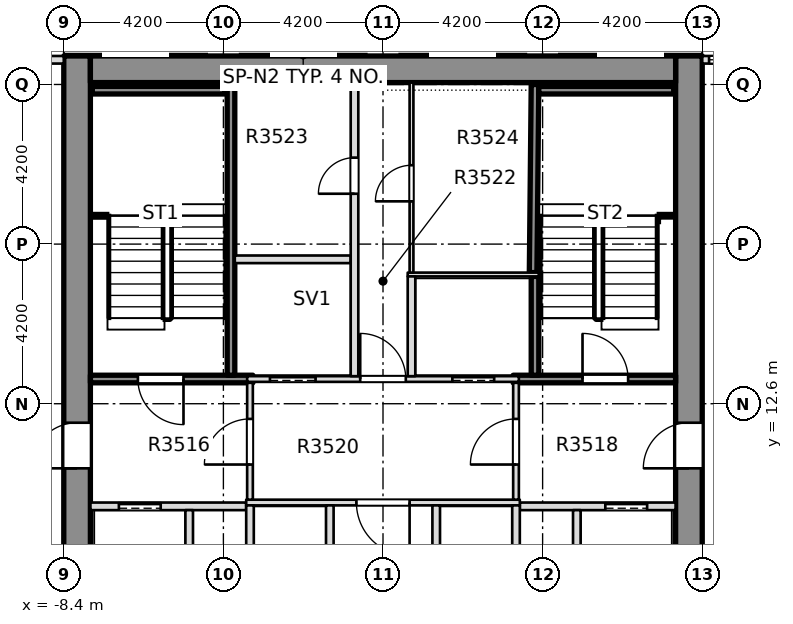
"""IFC4 building model, lengths in metres.
Left out: names, types, materials, properties, quantities, classifications, styles, units other than length and angle.
Written with IfcOpenShell. Run it as: python <this file> out.ifc"""

import sys

from ifc_helpers import new_model, si_unit, direction, frame, frame_2d, origin, place, context, subcontext, project, spatial, rectangle, extrude, element, fill, save


model = new_model("IFC4")
c1 = context("Model", 3, precision=1e-05, world=origin(), true_north=direction((0.0, 1.0)))
c2 = subcontext(c1, "Body", "Model", "MODEL_VIEW")
j1 = project(units=[si_unit("LENGTHUNIT", "METRE"), si_unit("PLANEANGLEUNIT", "RADIAN")], contexts=[c1])
p1 = place(None, origin())
s1 = spatial("IfcSite", under=j1, at=p1, CompositionType="ELEMENT")
p2 = place(p1, origin())
s2 = spatial("IfcBuilding", under=s1, at=p2, CompositionType="ELEMENT")
p3 = place(p2, frame((0.0, 0.0, 140.0)))
s3 = spatial("IfcBuildingStorey", under=s2, at=p3, CompositionType="ELEMENT", Elevation=140.0)
p4 = place(p3, frame((8.05, -8.4, -0.4), z_axis=(0.0, 0.0, 1.0), x_axis=(0.0, 1.0, 0.0)))
e1 = element("IfcWall", 1, at=p4, inside=s3, PredefinedType="SOLIDWALL", context=c2, shape_type="SweptSolid", body=[
    extrude(rectangle(XDim=30.15, YDim=0.7, at=frame_2d((15.075, 0.0))), origin(), (0.0, 0.0, 1.0), 3.45),
])
p5 = place(p4, frame((19.3, 0.0, 0.4)))
e2 = element("IfcOpeningElement", 2, at=p5, cuts=e1, PredefinedType="OPENING", context=c2, shape_type="SweptSolid", body=[
    extrude(rectangle(XDim=1.2, YDim=2.1, at=frame_2d((0.6, 1.05))), frame((0.0, 0.36, 0.0), z_axis=(0.0, -1.0, 0.0), x_axis=(1.0, 0.0, 0.0)), (0.0, 0.0, 1.0), 0.72),
])
p6 = place(p3, frame((-8.05, -8.4, -0.4), z_axis=(0.0, 0.0, 1.0), x_axis=(0.0, 1.0, 0.0)))
e3 = element("IfcWall", 3, at=p6, inside=s3, PredefinedType="SOLIDWALL", context=c2, shape_type="SweptSolid", body=[
    extrude(rectangle(XDim=30.15, YDim=0.7, at=frame_2d((15.075, 0.0))), origin(), (0.0, 0.0, 1.0), 3.45),
])
p7 = place(p6, frame((19.3, 0.0, 0.4)))
e4 = element("IfcOpeningElement", 4, at=p7, cuts=e3, PredefinedType="OPENING", context=c2, shape_type="SweptSolid", body=[
    extrude(rectangle(XDim=1.2, YDim=2.1, at=frame_2d((0.6, 1.05))), frame((0.0, 0.36, 0.0), z_axis=(0.0, -1.0, 0.0), x_axis=(1.0, 0.0, 0.0)), (0.0, 0.0, 1.0), 0.72),
])
p8 = place(p3, frame((-7.7, 21.4, -0.4), z_axis=(0.0, 0.0, 1.0), x_axis=(1.0, 0.0, 0.0)))
e5 = element("IfcWall", 5, at=p8, inside=s3, PredefinedType="SHEAR", context=c2, shape_type="SweptSolid", body=[
    extrude(rectangle(XDim=15.4, YDim=0.7, at=frame_2d((7.7, 0.0))), origin(), (0.0, 0.0, 1.0), 3.45),
])
p9 = place(p3, frame((12.05, 21.65, 0.0), z_axis=(0.0, 0.0, 1.0), x_axis=(-1.0, 0.0, 0.0)))
e6 = element("IfcWall", 6, at=p9, inside=s3, PredefinedType="STANDARD", context=c2, shape_type="SweptSolid", body=[
    extrude(rectangle(XDim=3.65, YDim=0.2, at=frame_2d((1.825, 0.0))), origin(), (0.0, 0.0, 1.0), 3.05),
])
p10 = place(p9, frame((1.67, 0.0, 0.2)))
e7 = element("IfcOpeningElement", 7, at=p10, cuts=e6, PredefinedType="OPENING", context=c2, shape_type="SweptSolid", body=[
    extrude(rectangle(XDim=1.8, YDim=2.65, at=frame_2d((0.9, 1.325))), frame((0.0, 0.11, 0.0), z_axis=(0.0, -1.0, 0.0), x_axis=(1.0, 0.0, 0.0)), (0.0, 0.0, 1.0), 0.22),
])
p11 = place(p3, frame((-8.4, 21.65, 0.0), z_axis=(0.0, 0.0, 1.0), x_axis=(-1.0, 0.0, 0.0)))
e8 = element("IfcWall", 8, at=p11, inside=s3, PredefinedType="STANDARD", context=c2, shape_type="SweptSolid", body=[
    extrude(rectangle(XDim=3.65, YDim=0.2, at=frame_2d((1.825, 0.0))), origin(), (0.0, 0.0, 1.0), 3.05),
])
p12 = place(p11, frame((0.375, 0.0, 0.2)))
e9 = element("IfcOpeningElement", 9, at=p12, cuts=e8, PredefinedType="OPENING", context=c2, shape_type="SweptSolid", body=[
    extrude(rectangle(XDim=1.8, YDim=2.65, at=frame_2d((0.9, 1.325))), frame((0.0, 0.11, 0.0), z_axis=(0.0, -1.0, 0.0), x_axis=(1.0, 0.0, 0.0)), (0.0, 0.0, 1.0), 0.22),
])
p13 = place(p3, frame((-7.699, 9.9, 0.0), z_axis=(0.0, 0.0, 1.0), x_axis=(1.0, 0.0, 0.0)))
e10 = element("IfcWall", 10, at=p13, inside=s3, PredefinedType="PARTITIONING", context=c2, shape_type="SweptSolid", body=[
    extrude(rectangle(XDim=4.099, YDim=0.2, at=frame_2d((2.049, 0.0))), origin(), (0.0, 0.0, 1.0), 3.05),
])
p14 = place(p13, frame((0.749, 0.0, 0.0)))
e11 = element("IfcOpeningElement", 11, at=p14, cuts=e10, PredefinedType="OPENING", context=c2, shape_type="SweptSolid", body=[
    extrude(rectangle(XDim=1.1, YDim=2.1, at=frame_2d((0.55, 1.05))), frame((0.0, 0.11, 0.0), z_axis=(0.0, -1.0, 0.0), x_axis=(1.0, 0.0, 0.0)), (0.0, 0.0, 1.0), 0.22),
])
p15 = place(p3, frame((3.6, 9.9, 0.0), z_axis=(0.0, 0.0, 1.0), x_axis=(1.0, 0.0, 0.0)))
e12 = element("IfcWall", 12, at=p15, inside=s3, PredefinedType="PARTITIONING", context=c2, shape_type="SweptSolid", body=[
    extrude(rectangle(XDim=4.099, YDim=0.2, at=frame_2d((2.049, 0.0))), origin(), (0.0, 0.0, 1.0), 3.05),
])
p16 = place(p15, frame((2.25, 0.0, 0.0)))
e13 = element("IfcOpeningElement", 13, at=p16, cuts=e12, PredefinedType="OPENING", context=c2, shape_type="SweptSolid", body=[
    extrude(rectangle(XDim=1.1, YDim=2.1, at=frame_2d((0.55, 1.05))), frame((0.0, 0.11, 0.0), z_axis=(0.0, -1.0, 0.0), x_axis=(1.0, 0.0, 0.0)), (0.0, 0.0, 1.0), 0.22),
])
p17 = place(p3, frame((-3.6, 10.0, 0.0), z_axis=(0.0, 0.0, 1.0), x_axis=(1.0, 0.0, 0.0)))
e14 = element("IfcWall", 14, at=p17, inside=s3, PredefinedType="PARTITIONING", context=c2, shape_type="SweptSolid", body=[
    extrude(rectangle(XDim=7.2, YDim=0.15, at=frame_2d((3.6, 0.0))), origin(), (0.0, 0.0, 1.0), 3.05),
])
p18 = place(p17, frame((2.9, 0.0, 0.0)))
e15 = element("IfcOpeningElement", 15, at=p18, cuts=e14, PredefinedType="OPENING", context=c2, shape_type="SweptSolid", body=[
    extrude(rectangle(XDim=1.4, YDim=2.1, at=frame_2d((0.7, 1.05))), frame((0.0, 0.085, 0.0), z_axis=(0.0, -1.0, 0.0), x_axis=(1.0, 0.0, 0.0)), (0.0, 0.0, 1.0), 0.17),
])
p19 = place(p3, frame((-7.699, 13.25, 0.0), z_axis=(0.0, 0.0, 1.0), x_axis=(1.0, 0.0, 0.0)))
e16 = element("IfcWall", 16, at=p19, inside=s3, PredefinedType="SOLIDWALL", context=c2, shape_type="SweptSolid", body=[
    extrude(rectangle(XDim=4.274, YDim=0.2, at=frame_2d((2.137, 0.0))), origin(), (0.0, 0.0, 1.0), 3.05),
])
p20 = place(p19, frame((1.249, 0.0, 0.0)))
e17 = element("IfcOpeningElement", 17, at=p20, cuts=e16, PredefinedType="OPENING", context=c2, shape_type="SweptSolid", body=[
    extrude(rectangle(XDim=1.2, YDim=2.1, at=frame_2d((0.6, 1.05))), frame((0.0, 0.11, 0.0), z_axis=(0.0, -1.0, 0.0), x_axis=(1.0, 0.0, 0.0)), (0.0, 0.0, 1.0), 0.22),
])
p21 = place(p3, frame((-3.575, 13.25, 0.0), z_axis=(0.0, 0.0, 1.0), x_axis=(1.0, 0.0, 0.0)))
e18 = element("IfcWall", 18, at=p21, inside=s3, PredefinedType="PARTITIONING", context=c2, shape_type="SweptSolid", body=[
    extrude(rectangle(XDim=7.15, YDim=0.15, at=frame_2d((3.575, 0.0))), origin(), (0.0, 0.0, 1.0), 3.05),
])
p22 = place(p21, frame((0.6, 0.0, 0.0)))
e19 = element("IfcOpeningElement", 19, at=p22, cuts=e18, PredefinedType="OPENING", context=c2, shape_type="SweptSolid", body=[
    extrude(rectangle(XDim=1.2, YDim=2.1, at=frame_2d((0.6, 1.05))), frame((0.0, 0.085, 0.0), z_axis=(0.0, -1.0, 0.0), x_axis=(1.0, 0.0, 0.0)), (0.0, 0.0, 1.0), 0.17),
])
p23 = place(p21, frame((5.4, 0.0, 0.0)))
e20 = element("IfcOpeningElement", 20, at=p23, cuts=e18, PredefinedType="OPENING", context=c2, shape_type="SweptSolid", body=[
    extrude(rectangle(XDim=1.1, YDim=2.1, at=frame_2d((0.55, 1.05))), frame((0.0, 0.085, 0.0), z_axis=(0.0, -1.0, 0.0), x_axis=(1.0, 0.0, 0.0)), (0.0, 0.0, 1.0), 0.17),
])
p24 = place(p21, frame((2.975, 0.0, 0.0)))
e21 = element("IfcOpeningElement", 21, at=p24, cuts=e18, PredefinedType="OPENING", context=c2, shape_type="SweptSolid", body=[
    extrude(rectangle(XDim=1.2, YDim=2.1, at=frame_2d((0.6, 1.05))), frame((0.0, 0.085, 0.0), z_axis=(0.0, -1.0, 0.0), x_axis=(1.0, 0.0, 0.0)), (0.0, 0.0, 1.0), 0.17),
])
p25 = place(p3, frame((3.425, 13.25, 0.0), z_axis=(0.0, 0.0, 1.0), x_axis=(1.0, 0.0, 0.0)))
e22 = element("IfcWall", 22, at=p25, inside=s3, PredefinedType="SOLIDWALL", context=c2, shape_type="SweptSolid", body=[
    extrude(rectangle(XDim=4.274, YDim=0.2, at=frame_2d((2.137, 0.0))), origin(), (0.0, 0.0, 1.0), 3.05),
])
p26 = place(p25, frame((1.825, 0.0, 0.0)))
e23 = element("IfcOpeningElement", 23, at=p26, cuts=e22, PredefinedType="OPENING", context=c2, shape_type="SweptSolid", body=[
    extrude(rectangle(XDim=1.2, YDim=2.1, at=frame_2d((0.6, 1.05))), frame((0.0, 0.11, 0.0), z_axis=(0.0, -1.0, 0.0), x_axis=(1.0, 0.0, 0.0)), (0.0, 0.0, 1.0), 0.22),
])
p27 = place(p3, frame((0.65, 16.0, 0.0), z_axis=(0.0, 0.0, 1.0), x_axis=(1.0, 0.0, 0.0)))
e24 = element("IfcWall", 24, at=p27, inside=s3, PredefinedType="PARTITIONING", context=c2, shape_type="SweptSolid", body=[
    extrude(rectangle(XDim=3.45, YDim=0.1, at=frame_2d((1.725, 0.0))), origin(), (0.0, 0.0, 1.0), 3.05),
])
p28 = place(p3, frame((-3.9, 16.4, 0.0), z_axis=(0.0, 0.0, 1.0), x_axis=(1.0, 0.0, 0.0)))
e25 = element("IfcWall", 25, at=p28, inside=s3, PredefinedType="PARTITIONING", context=c2, shape_type="SweptSolid", body=[
    extrude(rectangle(XDim=3.05, YDim=0.2, at=frame_2d((1.525, 0.0))), origin(), (0.0, 0.0, 1.0), 3.05),
])
p29 = place(p3, frame((-5.1, 7.075, 0.0), z_axis=(0.0, 0.0, 1.0), x_axis=(0.0, 1.0, 0.0)))
e26 = element("IfcWall", 26, at=p29, inside=s3, PredefinedType="PARTITIONING", context=c2, shape_type="SweptSolid", body=[
    extrude(rectangle(XDim=2.725, YDim=0.2, at=frame_2d((1.363, 0.0))), origin(), (0.0, 0.0, 1.0), 3.05),
])
p30 = place(p3, frame((-4.0, 13.35, 0.0), z_axis=(0.0, 0.0, 1.0), x_axis=(0.0, 1.0, 0.0)))
e27 = element("IfcWall", 27, at=p30, inside=s3, PredefinedType="SOLIDWALL", context=c2, shape_type="SweptSolid", body=[
    extrude(rectangle(XDim=7.699, YDim=0.2, at=frame_2d((3.85, 0.0))), origin(), (0.0, 0.0, 1.0), 3.05),
])
p31 = place(p3, frame((-3.5, 7.075, 0.0), z_axis=(0.0, 0.0, 1.0), x_axis=(0.0, 1.0, 0.0)))
e28 = element("IfcWall", 28, at=p31, inside=s3, PredefinedType="PARTITIONING", context=c2, shape_type="SweptSolid", body=[
    extrude(rectangle(XDim=2.85, YDim=0.2, at=frame_2d((1.425, 0.0))), origin(), (0.0, 0.0, 1.0), 3.05),
])
p32 = place(p3, frame((-3.5, 10.075, 0.0), z_axis=(0.0, 0.0, 1.0), x_axis=(0.0, 1.0, 0.0)))
e29 = element("IfcWall", 29, at=p32, inside=s3, PredefinedType="PARTITIONING", context=c2, shape_type="SweptSolid", body=[
    extrude(rectangle(XDim=3.075, YDim=0.15, at=frame_2d((1.538, 0.0))), origin(), (0.0, 0.0, 1.0), 3.05),
])
p33 = place(p32, frame((0.925, 0.0, 0.0)))
e30 = element("IfcOpeningElement", 30, at=p33, cuts=e29, PredefinedType="OPENING", context=c2, shape_type="SweptSolid", body=[
    extrude(rectangle(XDim=1.2, YDim=2.1, at=frame_2d((0.6, 1.05))), frame((0.0, 0.085, 0.0), z_axis=(0.0, -1.0, 0.0), x_axis=(1.0, 0.0, 0.0)), (0.0, 0.0, 1.0), 0.17),
])
p34 = place(p3, frame((-1.4, 7.075, 0.0), z_axis=(0.0, 0.0, 1.0), x_axis=(0.0, 1.0, 0.0)))
e31 = element("IfcWall", 31, at=p34, inside=s3, PredefinedType="PARTITIONING", context=c2, shape_type="SweptSolid", body=[
    extrude(rectangle(XDim=2.85, YDim=0.2, at=frame_2d((1.425, 0.0))), origin(), (0.0, 0.0, 1.0), 3.05),
])
p35 = place(p3, frame((-0.75, 13.325, 0.0), z_axis=(0.0, 0.0, 1.0), x_axis=(0.0, 1.0, 0.0)))
e32 = element("IfcWall", 32, at=p35, inside=s3, PredefinedType="PARTITIONING", context=c2, shape_type="SweptSolid", body=[
    extrude(rectangle(XDim=7.724, YDim=0.2, at=frame_2d((3.862, 0.0))), origin(), (0.0, 0.0, 1.0), 3.05),
])
p36 = place(p35, frame((4.8, 0.0, 0.0)))
e33 = element("IfcOpeningElement", 33, at=p36, cuts=e32, PredefinedType="OPENING", context=c2, shape_type="SweptSolid", body=[
    extrude(rectangle(XDim=0.95, YDim=2.1, at=frame_2d((0.475, 1.05))), frame((0.0, 0.11, 0.0), z_axis=(0.0, -1.0, 0.0), x_axis=(1.0, 0.0, 0.0)), (0.0, 0.0, 1.0), 0.22),
])
p37 = place(p3, frame((0.75, 13.325, 0.0), z_axis=(0.0, 0.0, 1.0), x_axis=(0.0, 1.0, 0.0)))
e34 = element("IfcWall", 34, at=p37, inside=s3, PredefinedType="PARTITIONING", context=c2, shape_type="SweptSolid", body=[
    extrude(rectangle(XDim=2.625, YDim=0.2, at=frame_2d((1.312, 0.0))), origin(), (0.0, 0.0, 1.0), 3.05),
])
p38 = place(p3, frame((0.75, 16.05, 0.0), z_axis=(0.0, 0.0, 1.0), x_axis=(0.0, 1.0, 0.0)))
e35 = element("IfcWall", 35, at=p38, inside=s3, PredefinedType="PARTITIONING", context=c2, shape_type="SweptSolid", body=[
    extrude(rectangle(XDim=4.999, YDim=0.1, at=frame_2d((2.5, 0.0))), origin(), (0.0, 0.0, 1.0), 3.05),
])
p39 = place(p38, frame((1.875, 0.0, 0.0)))
e36 = element("IfcOpeningElement", 36, at=p39, cuts=e35, PredefinedType="OPENING", context=c2, shape_type="SweptSolid", body=[
    extrude(rectangle(XDim=0.95, YDim=2.1, at=frame_2d((0.475, 1.05))), frame((0.0, 0.06, 0.0), z_axis=(0.0, -1.0, 0.0), x_axis=(1.0, 0.0, 0.0)), (0.0, 0.0, 1.0), 0.12),
])
for number, where, z_axis, x_axis in (
    (37, (1.4, 7.075, 0.0), (0.0, 0.0, 1.0), (0.0, 1.0, 0.0)),
    (38, (3.5, 7.075, 0.0), (0.0, 0.0, 1.0), (0.0, 1.0, 0.0)),
):
    element("IfcWall", number, at=place(p3, frame(where, z_axis=z_axis, x_axis=x_axis)), inside=s3, PredefinedType="PARTITIONING", context=c2, shape_type="SweptSolid", body=[
        extrude(rectangle(XDim=2.85, YDim=0.2, at=frame_2d((1.425, 0.0))), origin(), (0.0, 0.0, 1.0), 3.05),
    ])
p40 = place(p3, frame((3.5, 10.075, 0.0), z_axis=(0.0, 0.0, 1.0), x_axis=(0.0, 1.0, 0.0)))
e39 = element("IfcWall", 39, at=p40, inside=s3, PredefinedType="PARTITIONING", context=c2, shape_type="SweptSolid", body=[
    extrude(rectangle(XDim=3.075, YDim=0.15, at=frame_2d((1.538, 0.0))), origin(), (0.0, 0.0, 1.0), 3.05),
])
p41 = place(p40, frame((0.925, 0.0, 0.0)))
e40 = element("IfcOpeningElement", 40, at=p41, cuts=e39, PredefinedType="OPENING", context=c2, shape_type="SweptSolid", body=[
    extrude(rectangle(XDim=1.2, YDim=2.1, at=frame_2d((0.6, 1.05))), frame((0.0, 0.085, 0.0), z_axis=(0.0, -1.0, 0.0), x_axis=(1.0, 0.0, 0.0)), (0.0, 0.0, 1.0), 0.17),
])
p42 = place(p3, frame((4.0, 13.35, 0.0), z_axis=(0.0, 0.0, 1.0), x_axis=(0.0, 1.0, 0.0)))
e41 = element("IfcWall", 41, at=p42, inside=s3, PredefinedType="SOLIDWALL", context=c2, shape_type="SweptSolid", body=[
    extrude(rectangle(XDim=2.6, YDim=0.2, at=frame_2d((1.3, 0.0))), origin(), (0.0, 0.0, 1.0), 3.05),
])
p43 = place(p3, frame((3.95, 16.05, 0.0), z_axis=(0.0, 0.0, 1.0), x_axis=(0.010112452169, 0.999948867848, 0.0)))
e42 = element("IfcWall", 42, at=p43, inside=s3, PredefinedType="SOLIDWALL", context=c2, shape_type="SweptSolid", body=[
    extrude(rectangle(XDim=4.949, YDim=0.2, at=frame_2d((2.475, 0.0))), origin(), (0.0, 0.0, 1.0), 3.05),
])
p44 = place(p3, frame((5.1, 7.075, 0.0), z_axis=(0.0, 0.0, 1.0), x_axis=(0.0, 1.0, 0.0)))
e43 = element("IfcWall", 43, at=p44, inside=s3, PredefinedType="PARTITIONING", context=c2, shape_type="SweptSolid", body=[
    extrude(rectangle(XDim=2.725, YDim=0.2, at=frame_2d((1.363, 0.0))), origin(), (0.0, 0.0, 1.0), 3.05),
])
p45 = place(p3, frame((-7.65, 20.85, 0.0), z_axis=(0.0, 0.0, 1.0), x_axis=(1.0, 0.0, 0.0)))
e44 = element("IfcWall", 44, at=p45, inside=s3, PredefinedType="SOLIDWALL", context=c2, shape_type="SweptSolid", body=[
    extrude(rectangle(XDim=3.5, YDim=0.2, at=frame_2d((1.75, 0.0))), origin(), (0.0, 0.0, 1.0), 3.05),
])
p46 = place(p3, frame((4.1, 20.85, 0.0), z_axis=(0.0, 0.0, 1.0), x_axis=(1.0, 0.0, 0.0)))
e45 = element("IfcWall", 45, at=p46, inside=s3, PredefinedType="SOLIDWALL", context=c2, shape_type="SweptSolid", body=[
    extrude(rectangle(XDim=3.55, YDim=0.2, at=frame_2d((1.775, 0.0))), origin(), (0.0, 0.0, 1.0), 3.05),
])
p47 = place(p10, origin())
e46 = element("IfcWindow", 46, at=p47, inside=s3, PartitioningType="SINGLE_PANEL", PredefinedType="WINDOW", context=c2, shape_type="SweptSolid", body=[
    extrude(rectangle(XDim=1.8, YDim=2.65, at=frame_2d((0.9, 1.325))), frame((0.0, 0.03, 0.0), z_axis=(0.0, -1.0, 0.0), x_axis=(1.0, 0.0, 0.0)), (0.0, 0.0, 1.0), 0.06),
])
fill(e7, e46)
p48 = place(p20, origin())
e47 = element("IfcDoor", 47, at=p48, inside=s3, OperationType="SINGLE_SWING_LEFT", PredefinedType="DOOR", context=c2, shape_type="SweptSolid", body=[
    extrude(rectangle(XDim=1.2, YDim=2.1, at=frame_2d((0.6, 1.05))), frame((0.0, 0.025, 0.0), z_axis=(0.0, -1.0, 0.0), x_axis=(1.0, 0.0, 0.0)), (0.0, 0.0, 1.0), 0.05),
])
fill(e17, e47)
p49 = place(p14, origin())
e48 = element("IfcDoor", 48, at=p49, inside=s3, OperationType="SLIDING_TO_RIGHT", PredefinedType="DOOR", context=c2, shape_type="SweptSolid", body=[
    extrude(rectangle(XDim=1.1, YDim=2.1, at=frame_2d((0.55, 1.05))), frame((0.0, 0.025, 0.0), z_axis=(0.0, -1.0, 0.0), x_axis=(1.0, 0.0, 0.0)), (0.0, 0.0, 1.0), 0.05),
])
fill(e11, e48)
p50 = place(p26, origin())
e49 = element("IfcDoor", 49, at=p50, inside=s3, OperationType="SINGLE_SWING_RIGHT", PredefinedType="DOOR", context=c2, shape_type="SweptSolid", body=[
    extrude(rectangle(XDim=1.2, YDim=2.1, at=frame_2d((0.6, 1.05))), frame((0.0, 0.025, 0.0), z_axis=(0.0, -1.0, 0.0), x_axis=(1.0, 0.0, 0.0)), (0.0, 0.0, 1.0), 0.05),
])
fill(e23, e49)
p51 = place(p16, origin())
e50 = element("IfcDoor", 50, at=p51, inside=s3, OperationType="SLIDING_TO_LEFT", PredefinedType="DOOR", context=c2, shape_type="SweptSolid", body=[
    extrude(rectangle(XDim=1.1, YDim=2.1, at=frame_2d((0.55, 1.05))), frame((0.0, 0.025, 0.0), z_axis=(0.0, -1.0, 0.0), x_axis=(1.0, 0.0, 0.0)), (0.0, 0.0, 1.0), 0.05),
])
fill(e13, e50)
p52 = place(p18, origin())
e51 = element("IfcDoor", 51, at=p52, inside=s3, OperationType="SINGLE_SWING_RIGHT", PredefinedType="DOOR", context=c2, shape_type="SweptSolid", body=[
    extrude(rectangle(XDim=1.4, YDim=2.1, at=frame_2d((0.7, 1.05))), frame((0.0, 0.025, 0.0), z_axis=(0.0, -1.0, 0.0), x_axis=(1.0, 0.0, 0.0)), (0.0, 0.0, 1.0), 0.05),
])
fill(e15, e51)
p53 = place(p22, origin())
e52 = element("IfcDoor", 52, at=p53, inside=s3, OperationType="SLIDING_TO_RIGHT", PredefinedType="DOOR", context=c2, shape_type="SweptSolid", body=[
    extrude(rectangle(XDim=1.2, YDim=2.1, at=frame_2d((0.6, 1.05))), frame((0.0, 0.025, 0.0), z_axis=(0.0, -1.0, 0.0), x_axis=(1.0, 0.0, 0.0)), (0.0, 0.0, 1.0), 0.05),
])
fill(e19, e52)
p54 = place(p23, origin())
e53 = element("IfcDoor", 53, at=p54, inside=s3, OperationType="SLIDING_TO_LEFT", PredefinedType="DOOR", context=c2, shape_type="SweptSolid", body=[
    extrude(rectangle(XDim=1.1, YDim=2.1, at=frame_2d((0.55, 1.05))), frame((0.0, 0.025, 0.0), z_axis=(0.0, -1.0, 0.0), x_axis=(1.0, 0.0, 0.0)), (0.0, 0.0, 1.0), 0.05),
])
fill(e20, e53)
p55 = place(p24, origin())
e54 = element("IfcDoor", 54, at=p55, inside=s3, OperationType="SINGLE_SWING_RIGHT", PredefinedType="DOOR", context=c2, shape_type="SweptSolid", body=[
    extrude(rectangle(XDim=1.2, YDim=2.1, at=frame_2d((0.6, 1.05))), frame((0.0, 0.025, 0.0), z_axis=(0.0, -1.0, 0.0), x_axis=(1.0, 0.0, 0.0)), (0.0, 0.0, 1.0), 0.05),
])
fill(e21, e54)
p56 = place(p36, origin())
e55 = element("IfcDoor", 55, at=p56, inside=s3, OperationType="SINGLE_SWING_RIGHT", PredefinedType="DOOR", context=c2, shape_type="SweptSolid", body=[
    extrude(rectangle(XDim=0.95, YDim=2.1, at=frame_2d((0.475, 1.05))), frame((0.0, 0.025, 0.0), z_axis=(0.0, -1.0, 0.0), x_axis=(1.0, 0.0, 0.0)), (0.0, 0.0, 1.0), 0.05),
])
fill(e33, e55)
p57 = place(p39, origin())
e56 = element("IfcDoor", 56, at=p57, inside=s3, OperationType="SINGLE_SWING_LEFT", PredefinedType="DOOR", context=c2, shape_type="SweptSolid", body=[
    extrude(rectangle(XDim=0.95, YDim=2.1, at=frame_2d((0.475, 1.05))), frame((0.0, 0.025, 0.0), z_axis=(0.0, -1.0, 0.0), x_axis=(1.0, 0.0, 0.0)), (0.0, 0.0, 1.0), 0.05),
])
fill(e36, e56)
p58 = place(p33, origin())
e57 = element("IfcDoor", 57, at=p58, inside=s3, OperationType="SINGLE_SWING_RIGHT", PredefinedType="DOOR", context=c2, shape_type="SweptSolid", body=[
    extrude(rectangle(XDim=1.2, YDim=2.1, at=frame_2d((0.6, 1.05))), frame((0.0, 0.025, 0.0), z_axis=(0.0, -1.0, 0.0), x_axis=(1.0, 0.0, 0.0)), (0.0, 0.0, 1.0), 0.05),
])
fill(e30, e57)
p59 = place(p41, origin())
e58 = element("IfcDoor", 58, at=p59, inside=s3, OperationType="SINGLE_SWING_LEFT", PredefinedType="DOOR", context=c2, shape_type="SweptSolid", body=[
    extrude(rectangle(XDim=1.2, YDim=2.1, at=frame_2d((0.6, 1.05))), frame((0.0, 0.025, 0.0), z_axis=(0.0, -1.0, 0.0), x_axis=(1.0, 0.0, 0.0)), (0.0, 0.0, 1.0), 0.05),
])
fill(e40, e58)
p60 = place(p7, origin())
e59 = element("IfcDoor", 59, at=p60, inside=s3, OperationType="SINGLE_SWING_LEFT", PredefinedType="DOOR", context=c2, shape_type="SweptSolid", body=[
    extrude(rectangle(XDim=1.2, YDim=2.1, at=frame_2d((0.6, 1.05))), frame((0.0, 0.025, 0.0), z_axis=(0.0, -1.0, 0.0), x_axis=(1.0, 0.0, 0.0)), (0.0, 0.0, 1.0), 0.05),
])
fill(e4, e59)
p61 = place(p5, origin())
e60 = element("IfcDoor", 60, at=p61, inside=s3, OperationType="SINGLE_SWING_LEFT", PredefinedType="DOOR", context=c2, shape_type="SweptSolid", body=[
    extrude(rectangle(XDim=1.2, YDim=2.1, at=frame_2d((0.6, 1.05))), frame((0.0, 0.025, 0.0), z_axis=(0.0, -1.0, 0.0), x_axis=(1.0, 0.0, 0.0)), (0.0, 0.0, 1.0), 0.05),
])
fill(e2, e60)
save(model, sys.argv[1])
